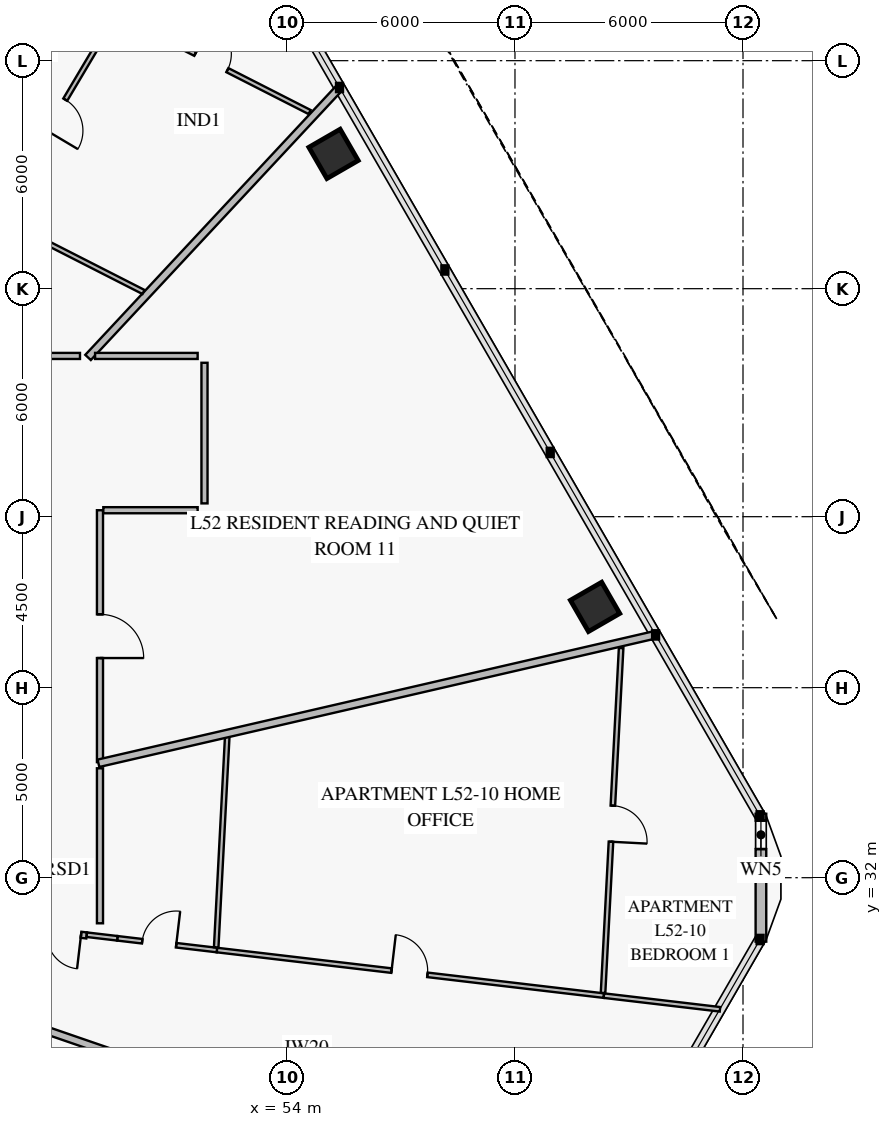
"""IFC4 building model, lengths in metres.
Left out: names, types, materials, properties, quantities, classifications, styles, units other than length and angle.
Written with IfcOpenShell. Run it as: python <this file> out.ifc"""

import sys

from ifc_helpers import new_model, si_unit, direction, frame, frame_2d, origin, origin_2d, place, context, subcontext, project, spatial, rectangle, extrude, element, fill, save


model = new_model("IFC4")
c1 = context("Model", 3, precision=1e-05, world=origin(), true_north=direction((0.0, 1.0)))
c2 = subcontext(c1, "Body", "Model", "MODEL_VIEW")
j1 = project(units=[si_unit("LENGTHUNIT", "METRE"), si_unit("PLANEANGLEUNIT", "RADIAN")], contexts=[c1])
p1 = place(None, origin())
s1 = spatial("IfcSite", under=j1, at=p1, CompositionType="ELEMENT")
p2 = place(p1, origin())
s2 = spatial("IfcBuilding", under=s1, at=p2, CompositionType="ELEMENT")
p3 = place(p2, frame((0.0, 0.0, 207.4)))
s3 = spatial("IfcBuildingStorey", under=s2, at=p3, CompositionType="ELEMENT", Elevation=207.4)
for number, where, z_axis, x_axis in (
    (1, (62.108, 39.126, 0.0), (0.0, 0.0, 1.0), (-0.5, 0.866, 0.0)),
    (2, (55.226, 51.047, 0.0), (0.0, 0.0, 1.0), (-0.5, 0.866, 0.0)),
):
    element("IfcColumn", number, at=place(p3, frame(where, z_axis=z_axis, x_axis=x_axis)), inside=s3, PredefinedType="COLUMN", context=c2, shape_type="SweptSolid", body=[
        extrude(rectangle(XDim=0.95, YDim=0.95, at=origin_2d()), origin(), (0.0, 0.0, 1.0), 3.55),
    ])
p4 = place(p3, frame((66.472, 33.683, 0.0), z_axis=(0.0, 0.0, 1.0), x_axis=(0.0, -1.0, 0.0)))
e3 = element("IfcWall", 3, at=p4, inside=s3, PredefinedType="SOLIDWALL", context=c2, shape_type="SweptSolid", body=[
    extrude(rectangle(XDim=3.365, YDim=0.28, at=frame_2d((1.683, 0.0))), origin(), (0.0, 0.0, 1.0), 3.55),
])
p5 = place(p4, frame((0.179, 0.0, 0.85)))
e4 = element("IfcOpeningElement", 4, at=p5, cuts=e3, PredefinedType="OPENING", context=c2, shape_type="SweptSolid", body=[
    extrude(rectangle(XDim=0.75, YDim=1.5, at=frame_2d((0.375, 0.75))), frame((0.0, 0.152, 0.0), z_axis=(0.0, -1.0, 0.0), x_axis=(1.0, 0.0, 0.0)), (0.0, 0.0, 1.0), 0.304),
])
p6 = place(p3, frame((47.256, 50.942, 0.0), z_axis=(0.0, 0.0, 1.0), x_axis=(0.510837189242, 0.859677477946, 0.0)))
e5 = element("IfcWall", 5, at=p6, inside=s3, PredefinedType="PARTITIONING", context=c2, shape_type="SweptSolid", body=[
    extrude(rectangle(XDim=4.441, YDim=0.12, at=frame_2d((2.221, 0.0))), origin(), (0.0, 0.0, 1.0), 2.87),
])
p7 = place(p6, frame((0.833, 0.0, 0.0)))
e6 = element("IfcOpeningElement", 6, at=p7, cuts=e5, PredefinedType="OPENING", context=c2, shape_type="SweptSolid", body=[
    extrude(rectangle(XDim=0.95, YDim=2.1, at=frame_2d((0.475, 1.05))), frame((0.0, 0.072, 0.0), z_axis=(0.0, -1.0, 0.0), x_axis=(1.0, 0.0, 0.0)), (0.0, 0.0, 1.0), 0.144),
])
p8 = place(p3, frame((54.597, 52.147, 0.0), z_axis=(0.0, 0.0, 1.0), x_axis=(-0.891024959867, 0.453954315867, 0.0)))
e7 = element("IfcWall", 7, at=p8, inside=s3, PredefinedType="PARTITIONING", context=c2, shape_type="SweptSolid", body=[
    extrude(rectangle(XDim=5.639, YDim=0.12, at=frame_2d((2.82, 0.0))), origin(), (0.0, 0.0, 1.0), 3.55),
])
p9 = place(p8, frame((2.429, 0.0, 0.0)))
e8 = element("IfcOpeningElement", 8, at=p9, cuts=e7, PredefinedType="OPENING", context=c2, shape_type="SweptSolid", body=[
    extrude(rectangle(XDim=0.95, YDim=2.1, at=frame_2d((0.475, 1.05))), frame((0.0, 0.072, 0.0), z_axis=(0.0, -1.0, 0.0), x_axis=(1.0, 0.0, 0.0)), (0.0, 0.0, 1.0), 0.144),
])
p10 = place(p3, frame((49.537, 30.405, 0.0), z_axis=(0.0, 0.0, 1.0), x_axis=(0.993127868893, -0.117034336965, 0.0)))
e9 = element("IfcWall", 9, at=p10, inside=s3, PredefinedType="PARTITIONING", context=c2, shape_type="SweptSolid", body=[
    extrude(rectangle(XDim=2.641, YDim=0.12, at=frame_2d((1.32, 0.0))), origin(), (0.0, 0.0, 1.0), 3.55),
])
p11 = place(p10, frame((0.659, 0.0, 0.0)))
e10 = element("IfcOpeningElement", 10, at=p11, cuts=e9, PredefinedType="OPENING", context=c2, shape_type="SweptSolid", body=[
    extrude(rectangle(XDim=0.9, YDim=2.1, at=frame_2d((0.45, 1.05))), frame((0.0, 0.072, 0.0), z_axis=(0.0, -1.0, 0.0), x_axis=(1.0, 0.0, 0.0)), (0.0, 0.0, 1.0), 0.144),
])
p12 = place(p3, frame((52.159, 30.096, 0.0), z_axis=(0.0, 0.0, 1.0), x_axis=(0.993128962812, -0.117025053828, 0.0)))
e11 = element("IfcWall", 11, at=p12, inside=s3, PredefinedType="PARTITIONING", context=c2, shape_type="SweptSolid", body=[
    extrude(rectangle(XDim=10.25, YDim=0.12, at=frame_2d((5.125, 0.0))), origin(), (0.0, 0.0, 1.0), 2.87),
])
p13 = place(p12, frame((4.625, 0.0, 0.0)))
e12 = element("IfcOpeningElement", 12, at=p13, cuts=e11, PredefinedType="OPENING", context=c2, shape_type="SweptSolid", body=[
    extrude(rectangle(XDim=0.95, YDim=2.1, at=frame_2d((0.475, 1.05))), frame((0.0, 0.072, 0.0), z_axis=(0.0, -1.0, 0.0), x_axis=(1.0, 0.0, 0.0)), (0.0, 0.0, 1.0), 0.144),
])
p14 = place(p3, frame((62.317, 28.968, 0.0), z_axis=(0.0, 0.0, 1.0), x_axis=(0.052336032443, 0.998629530761, 0.0)))
e13 = element("IfcWall", 13, at=p14, inside=s3, PredefinedType="PARTITIONING", context=c2, shape_type="SweptSolid", body=[
    extrude(rectangle(XDim=9.087, YDim=0.12, at=frame_2d((4.543, 0.0))), origin(), (0.0, 0.0, 1.0), 2.87),
])
p15 = place(p14, frame((3.984, 0.0, 0.0)))
e14 = element("IfcOpeningElement", 14, at=p15, cuts=e13, PredefinedType="OPENING", context=c2, shape_type="SweptSolid", body=[
    extrude(rectangle(XDim=0.95, YDim=2.1, at=frame_2d((0.475, 1.05))), frame((0.0, 0.072, 0.0), z_axis=(0.0, -1.0, 0.0), x_axis=(1.0, 0.0, 0.0)), (0.0, 0.0, 1.0), 0.144),
])
p16 = place(p3, frame((47.541, 30.62, 0.0), z_axis=(0.0, 0.0, 1.0), x_axis=(0.993117135496, -0.117125382325, 0.0)))
e15 = element("IfcWall", 15, at=p16, inside=s3, PredefinedType="PARTITIONING", context=c2, shape_type="SweptSolid", body=[
    extrude(rectangle(XDim=1.197, YDim=0.16, at=frame_2d((0.598, 0.0))), origin(), (0.0, 0.0, 1.0), 3.55),
])
p17 = place(p16, frame((0.148, 0.0, 0.0)))
e16 = element("IfcOpeningElement", 16, at=p17, cuts=e15, PredefinedType="OPENING", context=c2, shape_type="SweptSolid", body=[
    extrude(rectangle(XDim=0.9, YDim=2.1, at=frame_2d((0.45, 1.05))), frame((0.0, 0.092, 0.0), z_axis=(0.0, -1.0, 0.0), x_axis=(1.0, 0.0, 0.0)), (0.0, 0.0, 1.0), 0.184),
])
p18 = place(p3, frame((49.08, 35.04, 0.0), z_axis=(0.0, 0.0, 1.0), x_axis=(0.0, 1.0, 0.0)))
e17 = element("IfcWall", 17, at=p18, inside=s3, PredefinedType="PARTITIONING", context=c2, shape_type="SweptSolid", body=[
    extrude(rectangle(XDim=6.63, YDim=0.16, at=frame_2d((3.315, 0.0))), origin(), (0.0, 0.0, 1.0), 2.9),
])
p19 = place(p18, frame((2.74, 0.0, 0.0)))
e18 = element("IfcOpeningElement", 18, at=p19, cuts=e17, PredefinedType="OPENING", context=c2, shape_type="SweptSolid", body=[
    extrude(rectangle(XDim=1.15, YDim=2.2, at=frame_2d((0.575, 1.1))), frame((0.0, 0.092, 0.0), z_axis=(0.0, -1.0, 0.0), x_axis=(1.0, 0.0, 0.0)), (0.0, 0.0, 1.0), 0.184),
])
p20 = place(p3, frame((48.766, 45.69, 0.0), z_axis=(0.0, 0.0, 1.0), x_axis=(0.682001842328, 0.731350454338, 0.0)))
e19 = element("IfcWall", 19, at=p20, inside=s3, PredefinedType="PARTITIONING", context=c2, shape_type="SweptSolid", body=[
    extrude(rectangle(XDim=9.707, YDim=0.2, at=frame_2d((4.853, 0.0))), origin(), (0.0, 0.0, 1.0), 2.87),
])
p21 = place(p3, frame((50.225, 47.413, 0.0), z_axis=(0.0, 0.0, 1.0), x_axis=(-0.891026487489, 0.453951317426, 0.0)))
e20 = element("IfcWall", 20, at=p21, inside=s3, PredefinedType="PARTITIONING", context=c2, shape_type="SweptSolid", body=[
    extrude(rectangle(XDim=4.297, YDim=0.12, at=frame_2d((2.148, 0.0))), origin(), (0.0, 0.0, 1.0), 3.55),
])
p22 = place(p3, frame((46.858, 28.261, 0.0), z_axis=(0.0, 0.0, 1.0), x_axis=(0.945519192018, -0.325566364243, 0.0)))
e21 = element("IfcWall", 21, at=p22, inside=s3, PredefinedType="PARTITIONING", context=c2, shape_type="SweptSolid", body=[
    extrude(rectangle(XDim=16.208, YDim=0.2, at=frame_2d((8.104, 0.0))), origin(), (0.0, 0.0, 1.0), 2.87),
])
p23 = place(p3, frame((48.732, 30.5, 0.0), z_axis=(0.0, 0.0, 1.0), x_axis=(0.993146491389, -0.116876202202, 0.0)))
e22 = element("IfcWall", 22, at=p23, inside=s3, PredefinedType="PARTITIONING", context=c2, shape_type="SweptSolid", body=[
    extrude(rectangle(XDim=0.811, YDim=0.12, at=frame_2d((0.405, 0.0))), origin(), (0.0, 0.0, 1.0), 3.55),
])
p24 = place(p3, frame((62.339, 28.896, 0.0), z_axis=(0.0, 0.0, 1.0), x_axis=(0.99313759999, -0.116951731436, 0.0)))
e23 = element("IfcWall", 23, at=p24, inside=s3, PredefinedType="PARTITIONING", context=c2, shape_type="SweptSolid", body=[
    extrude(rectangle(XDim=3.077, YDim=0.12, at=frame_2d((1.539, 0.0))), origin(), (0.0, 0.0, 1.0), 3.55),
])
p25 = place(p3, frame((52.138, 30.167, 0.0), z_axis=(0.0, 0.0, 1.0), x_axis=(0.052317957022, 0.998630477891, 0.0)))
e24 = element("IfcWall", 24, at=p25, inside=s3, PredefinedType="PARTITIONING", context=c2, shape_type="SweptSolid", body=[
    extrude(rectangle(XDim=5.586, YDim=0.12, at=frame_2d((2.793, 0.0))), origin(), (0.0, 0.0, 1.0), 3.55),
])
p26 = place(p3, frame((49.04, 35.01, 0.0), z_axis=(0.0, 0.0, 1.0), x_axis=(0.974369033518, 0.224955521206, 0.0)))
e25 = element("IfcWall", 25, at=p26, inside=s3, PredefinedType="PARTITIONING", context=c2, shape_type="SweptSolid", body=[
    extrude(rectangle(XDim=15.042, YDim=0.2, at=frame_2d((7.521, 0.0))), origin(), (0.0, 0.0, 1.0), 2.87),
])
p27 = place(p3, frame((48.554, 45.73, 0.0), z_axis=(0.0, 0.0, 1.0), x_axis=(-1.0, 0.0, 0.0)))
e26 = element("IfcWall", 26, at=p27, inside=s3, PredefinedType="PARTITIONING", context=c2, shape_type="SweptSolid", body=[
    extrude(rectangle(XDim=4.316, YDim=0.16, at=frame_2d((2.158, 0.0))), origin(), (0.0, 0.0, 1.0), 3.55),
])
p28 = place(p3, frame((49.08, 30.8, 0.0), z_axis=(0.0, 0.0, 1.0), x_axis=(0.0, 1.0, 0.0)))
e27 = element("IfcWall", 27, at=p28, inside=s3, PredefinedType="PARTITIONING", context=c2, shape_type="SweptSolid", body=[
    extrude(rectangle(XDim=4.079, YDim=0.16, at=frame_2d((2.04, 0.0))), origin(), (0.0, 0.0, 1.0), 3.55),
])
p29 = place(p3, frame((51.83, 41.85, 0.0), z_axis=(0.0, 0.0, 1.0), x_axis=(0.0, 1.0, 0.0)))
e28 = element("IfcWall", 28, at=p29, inside=s3, PredefinedType="PARTITIONING", context=c2, shape_type="SweptSolid", body=[
    extrude(rectangle(XDim=3.7, YDim=0.16, at=frame_2d((1.85, 0.0))), origin(), (0.0, 0.0, 1.0), 3.15),
])
p30 = place(p3, frame((51.65, 45.73, 0.0), z_axis=(0.0, 0.0, 1.0), x_axis=(-1.0, 0.0, 0.0)))
e29 = element("IfcWall", 29, at=p30, inside=s3, PredefinedType="PARTITIONING", context=c2, shape_type="SweptSolid", body=[
    extrude(rectangle(XDim=2.699, YDim=0.16, at=frame_2d((1.349, 0.0))), origin(), (0.0, 0.0, 1.0), 2.9),
])
p31 = place(p3, frame((49.168, 41.67, 0.0), z_axis=(0.0, 0.0, 1.0), x_axis=(1.0, 0.0, 0.0)))
e30 = element("IfcWall", 30, at=p31, inside=s3, PredefinedType="PARTITIONING", context=c2, shape_type="SweptSolid", body=[
    extrude(rectangle(XDim=2.482, YDim=0.16, at=frame_2d((1.241, 0.0))), origin(), (0.0, 0.0, 1.0), 3.55),
])
p32 = place(p5, origin())
e31 = element("IfcWindow", 31, at=p32, inside=s3, PartitioningType="SINGLE_PANEL", PredefinedType="WINDOW", context=c2, shape_type="SweptSolid", body=[
    extrude(rectangle(XDim=0.75, YDim=1.5, at=frame_2d((0.375, 0.75))), frame((0.0, 0.03, 0.0), z_axis=(0.0, -1.0, 0.0), x_axis=(1.0, 0.0, 0.0)), (0.0, 0.0, 1.0), 0.06),
])
fill(e4, e31)
p33 = place(p7, frame((0.95, 0.0, 0.0), z_axis=(0.0, 0.0, 1.0), x_axis=(-1.0, 0.0, 0.0)))
e32 = element("IfcDoor", 32, at=p33, inside=s3, OperationType="SINGLE_SWING_RIGHT", PredefinedType="DOOR", context=c2, shape_type="SweptSolid", body=[
    extrude(rectangle(XDim=0.95, YDim=2.1, at=frame_2d((0.475, 1.05))), frame((0.0, 0.025, 0.0), z_axis=(0.0, -1.0, 0.0), x_axis=(1.0, 0.0, 0.0)), (0.0, 0.0, 1.0), 0.05),
])
fill(e6, e32)
p34 = place(p9, frame((0.95, 0.0, 0.0), z_axis=(0.0, 0.0, 1.0), x_axis=(-1.0, 0.0, 0.0)))
e33 = element("IfcDoor", 33, at=p34, inside=s3, OperationType="SINGLE_SWING_LEFT", PredefinedType="DOOR", context=c2, shape_type="SweptSolid", body=[
    extrude(rectangle(XDim=0.95, YDim=2.1, at=frame_2d((0.475, 1.05))), frame((0.0, 0.025, 0.0), z_axis=(0.0, -1.0, 0.0), x_axis=(1.0, 0.0, 0.0)), (0.0, 0.0, 1.0), 0.05),
])
fill(e8, e33)
p35 = place(p11, origin())
e34 = element("IfcDoor", 34, at=p35, inside=s3, OperationType="SINGLE_SWING_RIGHT", PredefinedType="DOOR", context=c2, shape_type="SweptSolid", body=[
    extrude(rectangle(XDim=0.9, YDim=2.1, at=frame_2d((0.45, 1.05))), frame((0.0, 0.025, 0.0), z_axis=(0.0, -1.0, 0.0), x_axis=(1.0, 0.0, 0.0)), (0.0, 0.0, 1.0), 0.05),
])
fill(e10, e34)
p36 = place(p13, origin())
e35 = element("IfcDoor", 35, at=p36, inside=s3, OperationType="SINGLE_SWING_LEFT", PredefinedType="DOOR", context=c2, shape_type="SweptSolid", body=[
    extrude(rectangle(XDim=0.95, YDim=2.1, at=frame_2d((0.475, 1.05))), frame((0.0, 0.025, 0.0), z_axis=(0.0, -1.0, 0.0), x_axis=(1.0, 0.0, 0.0)), (0.0, 0.0, 1.0), 0.05),
])
fill(e12, e35)
p37 = place(p15, frame((0.95, 0.0, 0.0), z_axis=(0.0, 0.0, 1.0), x_axis=(-1.0, 0.0, 0.0)))
e36 = element("IfcDoor", 36, at=p37, inside=s3, OperationType="SINGLE_SWING_RIGHT", PredefinedType="DOOR", context=c2, shape_type="SweptSolid", body=[
    extrude(rectangle(XDim=0.95, YDim=2.1, at=frame_2d((0.475, 1.05))), frame((0.0, 0.025, 0.0), z_axis=(0.0, -1.0, 0.0), x_axis=(1.0, 0.0, 0.0)), (0.0, 0.0, 1.0), 0.05),
])
fill(e14, e36)
p38 = place(p17, frame((0.9, 0.0, 0.0), z_axis=(0.0, 0.0, 1.0), x_axis=(-1.0, 0.0, 0.0)))
e37 = element("IfcDoor", 37, at=p38, inside=s3, OperationType="SINGLE_SWING_LEFT", PredefinedType="DOOR", context=c2, shape_type="SweptSolid", body=[
    extrude(rectangle(XDim=0.9, YDim=2.1, at=frame_2d((0.45, 1.05))), frame((0.0, 0.025, 0.0), z_axis=(0.0, -1.0, 0.0), x_axis=(1.0, 0.0, 0.0)), (0.0, 0.0, 1.0), 0.05),
])
fill(e16, e37)
p39 = place(p19, frame((1.15, 0.0, 0.0), z_axis=(0.0, 0.0, 1.0), x_axis=(-1.0, 0.0, 0.0)))
e38 = element("IfcDoor", 38, at=p39, inside=s3, OperationType="SINGLE_SWING_RIGHT", PredefinedType="DOOR", context=c2, shape_type="SweptSolid", body=[
    extrude(rectangle(XDim=1.15, YDim=2.2, at=frame_2d((0.575, 1.1))), frame((0.0, 0.025, 0.0), z_axis=(0.0, -1.0, 0.0), x_axis=(1.0, 0.0, 0.0)), (0.0, 0.0, 1.0), 0.05),
])
fill(e18, e38)
save(model, sys.argv[1])
